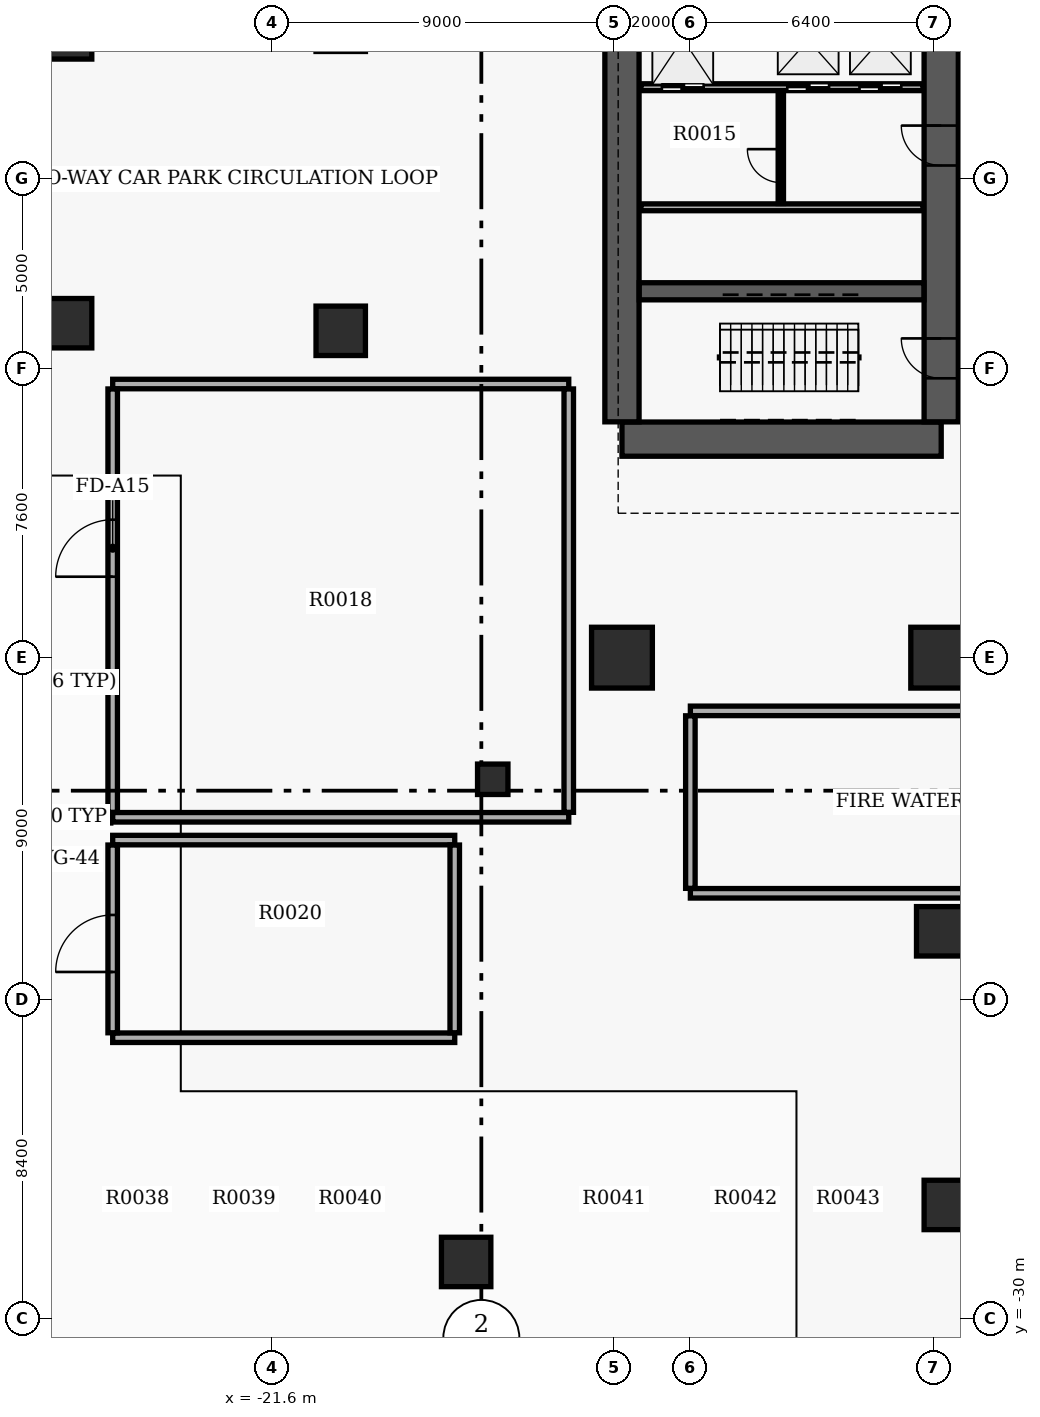
"""IFC4 building model, lengths in metres.
Left out: names, types, materials, properties, quantities, classifications, styles, units other than length and angle.
Written with IfcOpenShell. Run it as: python <this file> out.ifc"""

import sys

from ifc_helpers import new_model, si_unit, direction, frame, frame_2d, origin, origin_2d, place, context, subcontext, project, spatial, rectangle, circle, extrude, element, fill, save


model = new_model("IFC4")
c1 = context("Model", 3, precision=1e-05, world=origin(), true_north=direction((0.0, 1.0)))
c2 = subcontext(c1, "Body", "Model", "MODEL_VIEW")
j1 = project(units=[si_unit("LENGTHUNIT", "METRE"), si_unit("PLANEANGLEUNIT", "RADIAN")], contexts=[c1])
p1 = place(None, origin())
s1 = spatial("IfcSite", under=j1, at=p1, CompositionType="ELEMENT")
p2 = place(p1, origin())
s2 = spatial("IfcBuilding", under=s1, at=p2, CompositionType="ELEMENT")
p3 = place(p2, frame((0.0, 0.0, -10.4)))
s3 = spatial("IfcBuildingStorey", under=s2, at=p3, CompositionType="ELEMENT", Elevation=-10.4)
p4 = place(p3, frame((-15.8, -15.8, 0.0), z_axis=(0.0, 0.0, 1.0), x_axis=(1.0, 0.0, 0.0)))
e1 = element("IfcColumn", 1, at=p4, inside=s3, PredefinedType="COLUMN", context=c2, shape_type="SweptSolid", body=[
    extrude(rectangle(XDim=0.8, YDim=0.8, at=origin_2d()), origin(), (0.0, 0.0, 1.0), 5.2),
])
p5 = place(p3, frame((-12.4, -6.85, 0.0), z_axis=(0.0, 0.0, 1.0), x_axis=(1.0, 0.0, 0.0)))
e2 = element("IfcWall", 2, at=p5, inside=s3, PredefinedType="SHEAR", context=c2, shape_type="SweptSolid", body=[
    extrude(rectangle(XDim=8.4, YDim=0.9, at=frame_2d((4.2, 0.0))), origin(), (0.0, 0.0, 1.0), 4.85),
])
p6 = place(p3, frame((-12.4, -6.395, 0.0), z_axis=(0.0, 0.0, 1.0), x_axis=(0.0, 1.0, 0.0)))
e3 = element("IfcWall", 3, at=p6, inside=s3, PredefinedType="SHEAR", context=c2, shape_type="SweptSolid", body=[
    extrude(rectangle(XDim=10.89, YDim=0.9, at=frame_2d((5.445, 0.0))), origin(), (0.0, 0.0, 1.0), 4.85),
])
p7 = place(p3, frame((-4.0, -6.395, 0.0), z_axis=(0.0, 0.0, 1.0), x_axis=(0.0, 1.0, 0.0)))
e4 = element("IfcWall", 4, at=p7, inside=s3, PredefinedType="SHEAR", context=c2, shape_type="SweptSolid", body=[
    extrude(rectangle(XDim=10.89, YDim=0.9, at=frame_2d((5.445, 0.0))), origin(), (0.0, 0.0, 1.0), 4.85),
])
p8 = place(p7, frame((1.145, 0.0, 0.0)))
e5 = element("IfcOpeningElement", 5, at=p8, cuts=e4, PredefinedType="OPENING", context=c2, shape_type="SweptSolid", body=[
    extrude(rectangle(XDim=1.05, YDim=2.15, at=frame_2d((0.525, 1.075))), frame((0.0, 0.46, 0.0), z_axis=(0.0, -1.0, 0.0), x_axis=(1.0, 0.0, 0.0)), (0.0, 0.0, 1.0), 0.92),
])
p9 = place(p7, frame((6.745, 0.0, 0.0)))
e6 = element("IfcOpeningElement", 6, at=p9, cuts=e4, PredefinedType="OPENING", context=c2, shape_type="SweptSolid", body=[
    extrude(rectangle(XDim=1.05, YDim=2.15, at=frame_2d((0.525, 1.075))), frame((0.0, 0.46, 0.0), z_axis=(0.0, -1.0, 0.0), x_axis=(1.0, 0.0, 0.0)), (0.0, 0.0, 1.0), 0.92),
])
p10 = place(p3, frame((-11.945, -2.96, 0.0), z_axis=(0.0, 0.0, 1.0), x_axis=(1.0, 0.0, 0.0)))
e7 = element("IfcWall", 7, at=p10, inside=s3, PredefinedType="SHEAR", context=c2, shape_type="SweptSolid", body=[
    extrude(rectangle(XDim=7.49, YDim=0.45, at=frame_2d((3.745, 0.0))), origin(), (0.0, 0.0, 1.0), 4.85),
])
for number, where, z_axis, x_axis in (
    (8, (-12.4, -12.6, 0.0), (0.0, 0.0, 1.0), (1.0, 0.0, 0.0)),
    (9, (-4.0, -12.6, 0.0), (0.0, 0.0, 1.0), (1.0, 0.0, 0.0)),
):
    element("IfcColumn", number, at=place(p3, frame(where, z_axis=z_axis, x_axis=x_axis)), inside=s3, PredefinedType="COLUMN", context=c2, shape_type="SweptSolid", body=[
        extrude(rectangle(XDim=1.6, YDim=1.6, at=origin_2d()), origin(), (0.0, 0.0, 1.0), 5.2),
    ])
for number, where, z_axis, x_axis in (
    (10, (-19.8, -4.0, 0.0), (0.0, 0.0, 1.0), (1.0, 0.0, 0.0)),
    (11, (-4.0, -19.8, 0.0), (0.0, 0.0, 1.0), (1.0, 0.0, 0.0)),
    (12, (-27.0, -3.8, 0.0), (0.0, 0.0, 1.0), (1.0, 0.0, 0.0)),
    (13, (-27.0, 3.8, 0.0), (0.0, 0.0, 1.0), (1.0, 0.0, 0.0)),
    (14, (-3.8, -27.0, 0.0), (0.0, 0.0, 1.0), (1.0, 0.0, 0.0)),
):
    element("IfcColumn", number, at=place(p3, frame(where, z_axis=z_axis, x_axis=x_axis)), inside=s3, PredefinedType="COLUMN", context=c2, shape_type="SweptSolid", body=[
        extrude(rectangle(XDim=1.3, YDim=1.3, at=origin_2d()), origin(), (0.0, 0.0, 1.0), 5.2),
    ])
p11 = place(p3, frame((-16.5, -28.5, 0.0), z_axis=(0.0, 0.0, 1.0), x_axis=(1.0, 0.0, 0.0)))
e15 = element("IfcColumn", 15, at=p11, inside=s3, PredefinedType="COLUMN", context=c2, shape_type="SweptSolid", body=[
    extrude(circle(Radius=0.65, at=origin_2d()), origin(), (0.0, 0.0, 1.0), 5.2),
])
p12 = place(p3, frame((-33.15, -16.8, 0.0), z_axis=(0.0, 0.0, 1.0), x_axis=(1.0, 0.0, 0.0)))
e16 = element("IfcWall", 16, at=p12, inside=s3, PredefinedType="SOLIDWALL", context=c2, shape_type="SweptSolid", body=[
    extrude(rectangle(XDim=7.3, YDim=0.3, at=frame_2d((3.65, 0.0))), origin(), (0.0, 0.0, 1.0), 3.87),
])
p13 = place(p12, frame((0.6, 0.0, 0.0)))
e17 = element("IfcOpeningElement", 17, at=p13, cuts=e16, PredefinedType="OPENING", context=c2, shape_type="SweptSolid", body=[
    extrude(rectangle(XDim=4.4, YDim=2.4, at=frame_2d((2.2, 1.2))), frame((0.0, 0.16, 0.0), z_axis=(0.0, -1.0, 0.0), x_axis=(1.0, 0.0, 0.0)), (0.0, 0.0, 1.0), 0.32),
])
p14 = place(p3, frame((-11.9, 2.41, 0.0), z_axis=(0.0, 0.0, 1.0), x_axis=(1.0, 0.0, 0.0)))
e18 = element("IfcWall", 18, at=p14, inside=s3, PredefinedType="SOLIDWALL", context=c2, shape_type="SweptSolid", body=[
    extrude(rectangle(XDim=7.42, YDim=0.18, at=frame_2d((3.71, 0.0))), origin(), (0.0, 0.0, 1.0), 3.87),
])
p15 = place(p14, frame((0.55, 0.0, 0.0)))
e19 = element("IfcOpeningElement", 19, at=p15, cuts=e18, PredefinedType="OPENING", context=c2, shape_type="SweptSolid", body=[
    extrude(rectangle(XDim=1.1, YDim=2.15, at=frame_2d((0.55, 1.075))), frame((0.0, 0.1, 0.0), z_axis=(0.0, -1.0, 0.0), x_axis=(1.0, 0.0, 0.0)), (0.0, 0.0, 1.0), 0.2),
])
p16 = place(p14, frame((3.85, 0.0, 0.0)))
e20 = element("IfcOpeningElement", 20, at=p16, cuts=e18, PredefinedType="OPENING", context=c2, shape_type="SweptSolid", body=[
    extrude(rectangle(XDim=1.1, YDim=2.15, at=frame_2d((0.55, 1.075))), frame((0.0, 0.1, 0.0), z_axis=(0.0, -1.0, 0.0), x_axis=(1.0, 0.0, 0.0)), (0.0, 0.0, 1.0), 0.2),
])
p17 = place(p14, frame((5.75, 0.0, 0.0)))
e21 = element("IfcOpeningElement", 21, at=p17, cuts=e18, PredefinedType="OPENING", context=c2, shape_type="SweptSolid", body=[
    extrude(rectangle(XDim=1.1, YDim=2.15, at=frame_2d((0.55, 1.075))), frame((0.0, 0.1, 0.0), z_axis=(0.0, -1.0, 0.0), x_axis=(1.0, 0.0, 0.0)), (0.0, 0.0, 1.0), 0.2),
])
p18 = place(p3, frame((-11.9, -0.75, 0.0), z_axis=(0.0, 0.0, 1.0), x_axis=(1.0, 0.0, 0.0)))
e22 = element("IfcWall", 22, at=p18, inside=s3, PredefinedType="SOLIDWALL", context=c2, shape_type="SweptSolid", body=[
    extrude(rectangle(XDim=7.42, YDim=0.18, at=frame_2d((3.71, 0.0))), origin(), (0.0, 0.0, 1.0), 3.87),
])
p19 = place(p3, frame((-8.22, -0.65, 0.0), z_axis=(0.0, 0.0, 1.0), x_axis=(0.0, 1.0, 0.0)))
e23 = element("IfcWall", 23, at=p19, inside=s3, PredefinedType="SOLIDWALL", context=c2, shape_type="SweptSolid", body=[
    extrude(rectangle(XDim=2.96, YDim=0.14, at=frame_2d((1.48, 0.0))), origin(), (0.0, 0.0, 1.0), 3.87),
])
p20 = place(p19, frame((0.55, 0.0, 0.0)))
e24 = element("IfcOpeningElement", 24, at=p20, cuts=e23, PredefinedType="OPENING", context=c2, shape_type="SweptSolid", body=[
    extrude(rectangle(XDim=0.88, YDim=2.1, at=frame_2d((0.44, 1.05))), frame((0.0, 0.08, 0.0), z_axis=(0.0, -1.0, 0.0), x_axis=(1.0, 0.0, 0.0)), (0.0, 0.0, 1.0), 0.16),
])
for number, where, z_axis, x_axis in (
    (25, (-25.8, -16.8, 0.0), (0.0, 0.0, 1.0), (1.0, 0.0, 0.0)),
    (26, (-25.8, -5.4, 0.0), (0.0, 0.0, 1.0), (1.0, 0.0, 0.0)),
):
    element("IfcWall", number, at=place(p3, frame(where, z_axis=z_axis, x_axis=x_axis)), inside=s3, PredefinedType="SOLIDWALL", context=c2, shape_type="SweptSolid", body=[
        extrude(rectangle(XDim=12.0, YDim=0.25, at=frame_2d((6.0, 0.0))), origin(), (0.0, 0.0, 1.0), 3.87),
    ])
p21 = place(p3, frame((-25.8, -16.67, 0.0), z_axis=(0.0, 0.0, 1.0), x_axis=(0.0, 1.0, 0.0)))
e27 = element("IfcWall", 27, at=p21, inside=s3, PredefinedType="SOLIDWALL", context=c2, shape_type="SweptSolid", body=[
    extrude(rectangle(XDim=11.14, YDim=0.25, at=frame_2d((5.57, 0.0))), origin(), (0.0, 0.0, 1.0), 3.87),
])
p22 = place(p21, frame((6.2, 0.0, 0.0)))
e28 = element("IfcOpeningElement", 28, at=p22, cuts=e27, PredefinedType="OPENING", context=c2, shape_type="SweptSolid", body=[
    extrude(rectangle(XDim=1.5, YDim=2.15, at=frame_2d((0.75, 1.075))), frame((0.0, 0.135, 0.0), z_axis=(0.0, -1.0, 0.0), x_axis=(1.0, 0.0, 0.0)), (0.0, 0.0, 1.0), 0.27),
])
p23 = place(p3, frame((-13.8, -16.67, 0.0), z_axis=(0.0, 0.0, 1.0), x_axis=(0.0, 1.0, 0.0)))
e29 = element("IfcWall", 29, at=p23, inside=s3, PredefinedType="SOLIDWALL", context=c2, shape_type="SweptSolid", body=[
    extrude(rectangle(XDim=11.14, YDim=0.25, at=frame_2d((5.57, 0.0))), origin(), (0.0, 0.0, 1.0), 3.87),
])
for number, where, z_axis, x_axis in (
    (30, (-25.8, -22.6, 0.0), (0.0, 0.0, 1.0), (1.0, 0.0, 0.0)),
    (31, (-25.8, -17.4, 0.0), (0.0, 0.0, 1.0), (1.0, 0.0, 0.0)),
):
    element("IfcWall", number, at=place(p3, frame(where, z_axis=z_axis, x_axis=x_axis)), inside=s3, PredefinedType="SOLIDWALL", context=c2, shape_type="SweptSolid", body=[
        extrude(rectangle(XDim=9.0, YDim=0.25, at=frame_2d((4.5, 0.0))), origin(), (0.0, 0.0, 1.0), 3.87),
    ])
p24 = place(p3, frame((-25.8, -22.47, 0.0), z_axis=(0.0, 0.0, 1.0), x_axis=(0.0, 1.0, 0.0)))
e32 = element("IfcWall", 32, at=p24, inside=s3, PredefinedType="SOLIDWALL", context=c2, shape_type="SweptSolid", body=[
    extrude(rectangle(XDim=4.94, YDim=0.25, at=frame_2d((2.47, 0.0))), origin(), (0.0, 0.0, 1.0), 3.87),
])
p25 = place(p24, frame((1.6, 0.0, 0.0)))
e33 = element("IfcOpeningElement", 33, at=p25, cuts=e32, PredefinedType="OPENING", context=c2, shape_type="SweptSolid", body=[
    extrude(rectangle(XDim=1.5, YDim=2.15, at=frame_2d((0.75, 1.075))), frame((0.0, 0.135, 0.0), z_axis=(0.0, -1.0, 0.0), x_axis=(1.0, 0.0, 0.0)), (0.0, 0.0, 1.0), 0.27),
])
p26 = place(p3, frame((-16.8, -22.47, 0.0), z_axis=(0.0, 0.0, 1.0), x_axis=(0.0, 1.0, 0.0)))
e34 = element("IfcWall", 34, at=p26, inside=s3, PredefinedType="SOLIDWALL", context=c2, shape_type="SweptSolid", body=[
    extrude(rectangle(XDim=4.94, YDim=0.25, at=frame_2d((2.47, 0.0))), origin(), (0.0, 0.0, 1.0), 3.87),
])
p27 = place(p3, frame((-10.6, -18.8, 0.0), z_axis=(0.0, 0.0, 1.0), x_axis=(1.0, 0.0, 0.0)))
e35 = element("IfcWall", 35, at=p27, inside=s3, PredefinedType="SOLIDWALL", context=c2, shape_type="SweptSolid", body=[
    extrude(rectangle(XDim=21.2, YDim=0.25, at=frame_2d((10.6, 0.0))), origin(), (0.0, 0.0, 1.0), 3.87),
])
p28 = place(p27, frame((9.8, 0.0, 0.0)))
e36 = element("IfcOpeningElement", 36, at=p28, cuts=e35, PredefinedType="OPENING", context=c2, shape_type="SweptSolid", body=[
    extrude(rectangle(XDim=1.5, YDim=2.15, at=frame_2d((0.75, 1.075))), frame((0.0, 0.135, 0.0), z_axis=(0.0, -1.0, 0.0), x_axis=(1.0, 0.0, 0.0)), (0.0, 0.0, 1.0), 0.27),
])
p29 = place(p3, frame((-10.6, -14.0, 0.0), z_axis=(0.0, 0.0, 1.0), x_axis=(1.0, 0.0, 0.0)))
e37 = element("IfcWall", 37, at=p29, inside=s3, PredefinedType="SOLIDWALL", context=c2, shape_type="SweptSolid", body=[
    extrude(rectangle(XDim=21.2, YDim=0.25, at=frame_2d((10.6, 0.0))), origin(), (0.0, 0.0, 1.0), 3.87),
])
p30 = place(p3, frame((-10.6, -18.67, 0.0), z_axis=(0.0, 0.0, 1.0), x_axis=(0.0, 1.0, 0.0)))
e38 = element("IfcWall", 38, at=p30, inside=s3, PredefinedType="SOLIDWALL", context=c2, shape_type="SweptSolid", body=[
    extrude(rectangle(XDim=4.54, YDim=0.25, at=frame_2d((2.27, 0.0))), origin(), (0.0, 0.0, 1.0), 3.87),
])
p31 = place(p8, origin())
e39 = element("IfcDoor", 39, at=p31, inside=s3, OperationType="SINGLE_SWING_RIGHT", PredefinedType="DOOR", context=c2, shape_type="SweptSolid", body=[
    extrude(rectangle(XDim=1.05, YDim=2.15, at=frame_2d((0.525, 1.075))), frame((0.0, 0.025, 0.0), z_axis=(0.0, -1.0, 0.0), x_axis=(1.0, 0.0, 0.0)), (0.0, 0.0, 1.0), 0.05),
])
fill(e5, e39)
p32 = place(p9, origin())
e40 = element("IfcDoor", 40, at=p32, inside=s3, OperationType="SINGLE_SWING_RIGHT", PredefinedType="DOOR", context=c2, shape_type="SweptSolid", body=[
    extrude(rectangle(XDim=1.05, YDim=2.15, at=frame_2d((0.525, 1.075))), frame((0.0, 0.025, 0.0), z_axis=(0.0, -1.0, 0.0), x_axis=(1.0, 0.0, 0.0)), (0.0, 0.0, 1.0), 0.05),
])
fill(e6, e40)
p33 = place(p15, origin())
e41 = element("IfcDoor", 41, at=p33, inside=s3, OperationType="DOUBLE_DOOR_SLIDING", PredefinedType="DOOR", context=c2, shape_type="SweptSolid", body=[
    extrude(rectangle(XDim=1.1, YDim=2.15, at=frame_2d((0.55, 1.075))), frame((0.0, 0.025, 0.0), z_axis=(0.0, -1.0, 0.0), x_axis=(1.0, 0.0, 0.0)), (0.0, 0.0, 1.0), 0.05),
])
fill(e19, e41)
p34 = place(p16, origin())
e42 = element("IfcDoor", 42, at=p34, inside=s3, OperationType="DOUBLE_DOOR_SLIDING", PredefinedType="DOOR", context=c2, shape_type="SweptSolid", body=[
    extrude(rectangle(XDim=1.1, YDim=2.15, at=frame_2d((0.55, 1.075))), frame((0.0, 0.025, 0.0), z_axis=(0.0, -1.0, 0.0), x_axis=(1.0, 0.0, 0.0)), (0.0, 0.0, 1.0), 0.05),
])
fill(e20, e42)
p35 = place(p17, origin())
e43 = element("IfcDoor", 43, at=p35, inside=s3, OperationType="DOUBLE_DOOR_SLIDING", PredefinedType="DOOR", context=c2, shape_type="SweptSolid", body=[
    extrude(rectangle(XDim=1.1, YDim=2.15, at=frame_2d((0.55, 1.075))), frame((0.0, 0.025, 0.0), z_axis=(0.0, -1.0, 0.0), x_axis=(1.0, 0.0, 0.0)), (0.0, 0.0, 1.0), 0.05),
])
fill(e21, e43)
p36 = place(p20, origin())
e44 = element("IfcDoor", 44, at=p36, inside=s3, OperationType="SINGLE_SWING_RIGHT", PredefinedType="DOOR", context=c2, shape_type="SweptSolid", body=[
    extrude(rectangle(XDim=0.88, YDim=2.1, at=frame_2d((0.44, 1.05))), frame((0.0, 0.025, 0.0), z_axis=(0.0, -1.0, 0.0), x_axis=(1.0, 0.0, 0.0)), (0.0, 0.0, 1.0), 0.05),
])
fill(e24, e44)
p37 = place(p22, origin())
e45 = element("IfcDoor", 45, at=p37, inside=s3, OperationType="DOUBLE_DOOR_SINGLE_SWING", PredefinedType="DOOR", context=c2, shape_type="SweptSolid", body=[
    extrude(rectangle(XDim=1.5, YDim=2.15, at=frame_2d((0.75, 1.075))), frame((0.0, 0.025, 0.0), z_axis=(0.0, -1.0, 0.0), x_axis=(1.0, 0.0, 0.0)), (0.0, 0.0, 1.0), 0.05),
])
fill(e28, e45)
p38 = place(p25, origin())
e46 = element("IfcDoor", 46, at=p38, inside=s3, OperationType="DOUBLE_DOOR_SINGLE_SWING", PredefinedType="DOOR", context=c2, shape_type="SweptSolid", body=[
    extrude(rectangle(XDim=1.5, YDim=2.15, at=frame_2d((0.75, 1.075))), frame((0.0, 0.025, 0.0), z_axis=(0.0, -1.0, 0.0), x_axis=(1.0, 0.0, 0.0)), (0.0, 0.0, 1.0), 0.05),
])
fill(e33, e46)
save(model, sys.argv[1])
